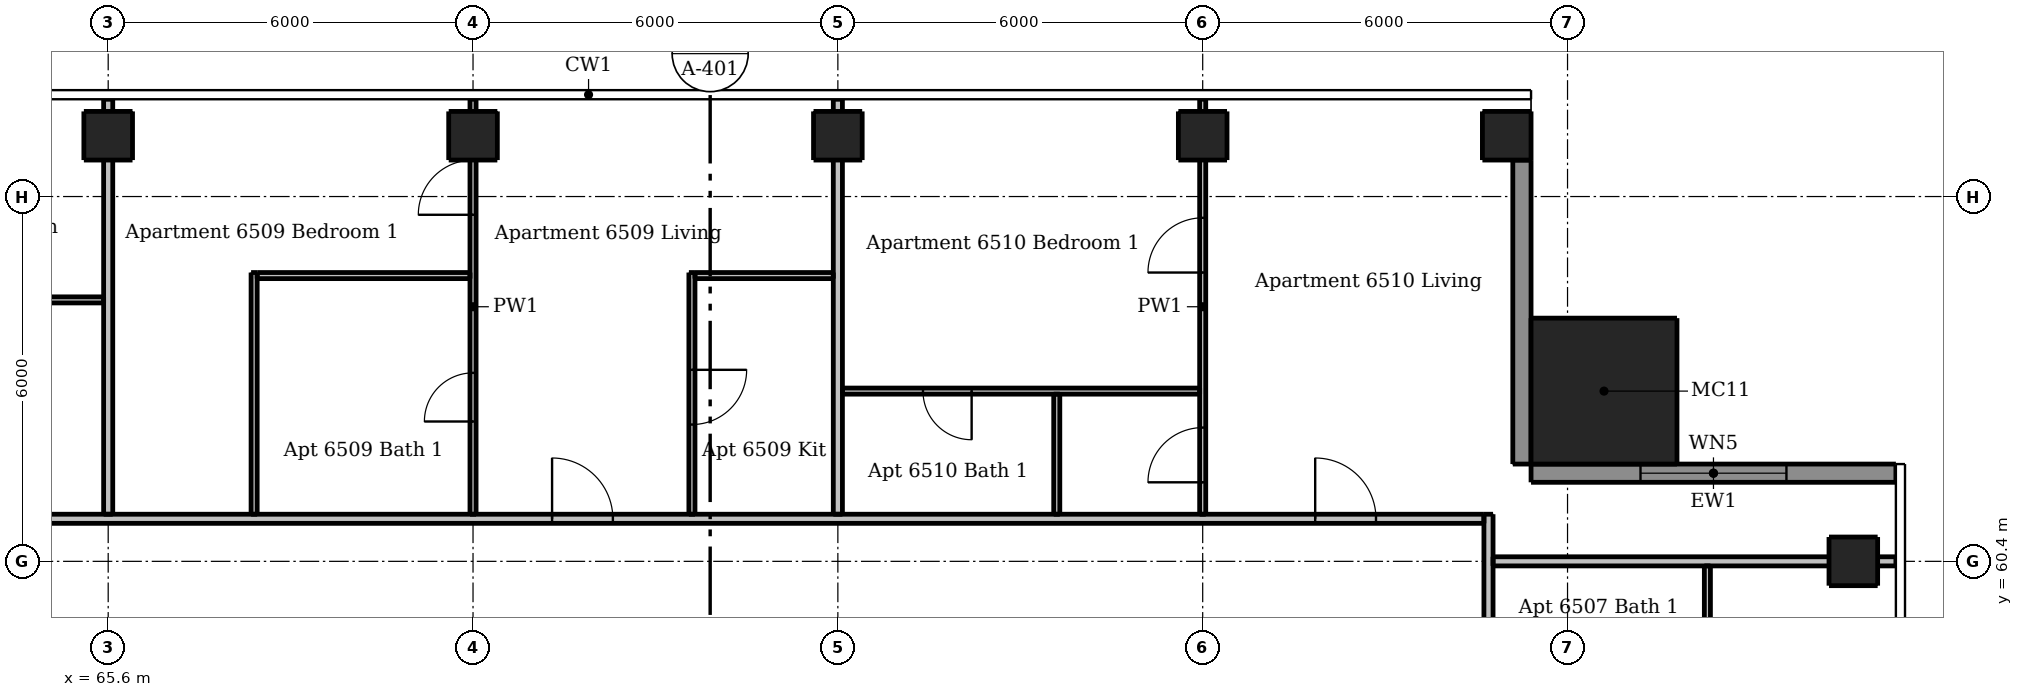
"""IFC4 building model, lengths in metres.
Left out: names, types, materials, properties, quantities, classifications, styles, units other than length and angle.
Written with IfcOpenShell. Run it as: python <this file> out.ifc"""

import sys

from ifc_helpers import new_model, si_unit, direction, frame, frame_2d, origin, origin_2d, place, context, subcontext, project, spatial, rectangle, extrude, element, fill, save


model = new_model("IFC4")
c1 = context("Model", 3, precision=1e-05, world=origin(), true_north=direction((0.0, 1.0)))
c2 = subcontext(c1, "Body", "Model", "MODEL_VIEW")
j1 = project(units=[si_unit("LENGTHUNIT", "METRE"), si_unit("PLANEANGLEUNIT", "RADIAN")], contexts=[c1])
p1 = place(None, origin())
s1 = spatial("IfcSite", under=j1, at=p1, CompositionType="ELEMENT")
p2 = place(p1, origin())
s2 = spatial("IfcBuilding", under=s1, at=p2, CompositionType="ELEMENT")
p3 = place(p2, frame((0.0, 0.0, 245.5)))
s3 = spatial("IfcBuildingStorey", under=s2, at=p3, CompositionType="ELEMENT", Elevation=245.5)
for number, where, z_axis, x_axis in (
    (1, (94.3, 60.4, 0.0), (0.0, 0.0, 1.0), (1.0, 0.0, 0.0)),
    (2, (65.6, 67.4, 0.0), (0.0, 0.0, 1.0), (1.0, 0.0, 0.0)),
    (3, (71.6, 67.4, 0.0), (0.0, 0.0, 1.0), (1.0, 0.0, 0.0)),
    (4, (77.6, 67.4, 0.0), (0.0, 0.0, 1.0), (1.0, 0.0, 0.0)),
    (5, (83.6, 67.4, 0.0), (0.0, 0.0, 1.0), (1.0, 0.0, 0.0)),
    (6, (88.6, 67.4, 0.0), (0.0, 0.0, 1.0), (1.0, 0.0, 0.0)),
):
    element("IfcColumn", number, at=place(p3, frame(where, z_axis=z_axis, x_axis=x_axis)), inside=s3, PredefinedType="COLUMN", context=c2, shape_type="SweptSolid", body=[
        extrude(rectangle(XDim=0.8, YDim=0.8, at=origin_2d()), origin(), (0.0, 0.0, 1.0), 3.05),
    ])
p4 = place(p3, frame((90.2, 63.2, 0.0), z_axis=(0.0, 0.0, 1.0), x_axis=(1.0, 0.0, 0.0)))
e7 = element("IfcColumn", 7, at=p4, inside=s3, PredefinedType="COLUMN", context=c2, shape_type="SweptSolid", body=[
    extrude(rectangle(XDim=2.4, YDim=2.4, at=origin_2d()), origin(), (0.0, 0.0, 1.0), 3.3),
])
p5 = place(p3, frame((95.0, 61.85, 0.0), z_axis=(0.0, 0.0, 1.0), x_axis=(-1.0, 0.0, 0.0)))
e8 = element("IfcWall", 8, at=p5, inside=s3, PredefinedType="SOLIDWALL", context=c2, shape_type="SweptSolid", body=[
    extrude(rectangle(XDim=6.0, YDim=0.3, at=frame_2d((3.0, 0.0))), origin(), (0.0, 0.0, 1.0), 3.05),
])
p6 = place(p5, frame((1.8, 0.0, 0.15)))
e9 = element("IfcOpeningElement", 9, at=p6, cuts=e8, PredefinedType="OPENING", context=c2, shape_type="SweptSolid", body=[
    extrude(rectangle(XDim=2.4, YDim=2.1, at=frame_2d((1.2, 1.05))), frame((0.0, 0.16, 0.0), z_axis=(0.0, -1.0, 0.0), x_axis=(1.0, 0.0, 0.0)), (0.0, 0.0, 1.0), 0.32),
])
p7 = place(p3, frame((88.85, 62.0, 0.0), z_axis=(0.0, 0.0, 1.0), x_axis=(0.0, 1.0, 0.0)))
e10 = element("IfcWall", 10, at=p7, inside=s3, PredefinedType="SOLIDWALL", context=c2, shape_type="SweptSolid", body=[
    extrude(rectangle(XDim=5.0, YDim=0.3, at=frame_2d((2.5, 0.0))), origin(), (0.0, 0.0, 1.0), 3.05),
])
p8 = place(p3, frame((68.0, 61.175, 0.0), z_axis=(0.0, 0.0, 1.0), x_axis=(0.0, 1.0, 0.0)))
e11 = element("IfcWall", 11, at=p8, inside=s3, PredefinedType="PARTITIONING", context=c2, shape_type="SweptSolid", body=[
    extrude(rectangle(XDim=3.975, YDim=0.1, at=frame_2d((1.987, 0.0))), origin(), (0.0, 0.0, 1.0), 3.05),
])
p9 = place(p3, frame((71.6, 61.175, 0.0), z_axis=(0.0, 0.0, 1.0), x_axis=(0.0, 1.0, 0.0)))
e12 = element("IfcWall", 12, at=p9, inside=s3, PredefinedType="PARTITIONING", context=c2, shape_type="SweptSolid", body=[
    extrude(rectangle(XDim=6.825, YDim=0.1, at=frame_2d((3.413, 0.0))), origin(), (0.0, 0.0, 1.0), 2.516),
])
p10 = place(p9, frame((4.925, 0.0, 0.0)))
e13 = element("IfcOpeningElement", 13, at=p10, cuts=e12, PredefinedType="OPENING", context=c2, shape_type="SweptSolid", body=[
    extrude(rectangle(XDim=0.9, YDim=2.1, at=frame_2d((0.45, 1.05))), frame((0.0, 0.06, 0.0), z_axis=(0.0, -1.0, 0.0), x_axis=(1.0, 0.0, 0.0)), (0.0, 0.0, 1.0), 0.12),
])
p11 = place(p9, frame((1.525, 0.0, 0.0)))
e14 = element("IfcOpeningElement", 14, at=p11, cuts=e12, PredefinedType="OPENING", context=c2, shape_type="SweptSolid", body=[
    extrude(rectangle(XDim=0.8, YDim=2.1, at=frame_2d((0.4, 1.05))), frame((0.0, 0.06, 0.0), z_axis=(0.0, -1.0, 0.0), x_axis=(1.0, 0.0, 0.0)), (0.0, 0.0, 1.0), 0.12),
])
p12 = place(p3, frame((75.2, 65.15, 0.0), z_axis=(0.0, 0.0, 1.0), x_axis=(0.0, -1.0, 0.0)))
e15 = element("IfcWall", 15, at=p12, inside=s3, PredefinedType="PARTITIONING", context=c2, shape_type="SweptSolid", body=[
    extrude(rectangle(XDim=3.975, YDim=0.1, at=frame_2d((1.987, 0.0))), origin(), (0.0, 0.0, 1.0), 3.05),
])
p13 = place(p12, frame((1.6, 0.0, 0.0)))
e16 = element("IfcOpeningElement", 16, at=p13, cuts=e15, PredefinedType="OPENING", context=c2, shape_type="SweptSolid", body=[
    extrude(rectangle(XDim=0.9, YDim=2.1, at=frame_2d((0.45, 1.05))), frame((0.0, 0.06, 0.0), z_axis=(0.0, -1.0, 0.0), x_axis=(1.0, 0.0, 0.0)), (0.0, 0.0, 1.0), 0.12),
])
p14 = place(p3, frame((81.2, 61.175, 0.0), z_axis=(0.0, 0.0, 1.0), x_axis=(0.0, 1.0, 0.0)))
e17 = element("IfcWall", 17, at=p14, inside=s3, PredefinedType="PARTITIONING", context=c2, shape_type="SweptSolid", body=[
    extrude(rectangle(XDim=1.975, YDim=0.1, at=frame_2d((0.987, 0.0))), origin(), (0.0, 0.0, 1.0), 3.05),
])
p15 = place(p3, frame((83.6, 61.175, 0.0), z_axis=(0.0, 0.0, 1.0), x_axis=(0.0, 1.0, 0.0)))
e18 = element("IfcWall", 18, at=p15, inside=s3, PredefinedType="PARTITIONING", context=c2, shape_type="SweptSolid", body=[
    extrude(rectangle(XDim=6.825, YDim=0.1, at=frame_2d((3.413, 0.0))), origin(), (0.0, 0.0, 1.0), 2.516),
])
p16 = place(p15, frame((0.525, 0.0, 0.0)))
e19 = element("IfcOpeningElement", 19, at=p16, cuts=e18, PredefinedType="OPENING", context=c2, shape_type="SweptSolid", body=[
    extrude(rectangle(XDim=0.9, YDim=2.1, at=frame_2d((0.45, 1.05))), frame((0.0, 0.06, 0.0), z_axis=(0.0, -1.0, 0.0), x_axis=(1.0, 0.0, 0.0)), (0.0, 0.0, 1.0), 0.12),
])
p17 = place(p15, frame((3.975, 0.0, 0.0)))
e20 = element("IfcOpeningElement", 20, at=p17, cuts=e18, PredefinedType="OPENING", context=c2, shape_type="SweptSolid", body=[
    extrude(rectangle(XDim=0.9, YDim=2.1, at=frame_2d((0.45, 1.05))), frame((0.0, 0.06, 0.0), z_axis=(0.0, -1.0, 0.0), x_axis=(1.0, 0.0, 0.0)), (0.0, 0.0, 1.0), 0.12),
])
p18 = place(p3, frame((91.9, 58.25, 0.0), z_axis=(0.0, 0.0, 1.0), x_axis=(0.0, 1.0, 0.0)))
e21 = element("IfcWall", 21, at=p18, inside=s3, PredefinedType="PARTITIONING", context=c2, shape_type="SweptSolid", body=[
    extrude(rectangle(XDim=2.075, YDim=0.1, at=frame_2d((1.038, 0.0))), origin(), (0.0, 0.0, 1.0), 3.05),
])
p19 = place(p3, frame((68.05, 65.1, 0.0), z_axis=(0.0, 0.0, 1.0), x_axis=(1.0, 0.0, 0.0)))
e22 = element("IfcWall", 22, at=p19, inside=s3, PredefinedType="PARTITIONING", context=c2, shape_type="SweptSolid", body=[
    extrude(rectangle(XDim=3.5, YDim=0.1, at=frame_2d((1.75, 0.0))), origin(), (0.0, 0.0, 1.0), 3.05),
])
p20 = place(p3, frame((75.25, 65.1, 0.0), z_axis=(0.0, 0.0, 1.0), x_axis=(1.0, 0.0, 0.0)))
e23 = element("IfcWall", 23, at=p20, inside=s3, PredefinedType="PARTITIONING", context=c2, shape_type="SweptSolid", body=[
    extrude(rectangle(XDim=2.275, YDim=0.1, at=frame_2d((1.137, 0.0))), origin(), (0.0, 0.0, 1.0), 3.05),
])
p21 = place(p3, frame((63.55, 64.7, 0.0), z_axis=(0.0, 0.0, 1.0), x_axis=(1.0, 0.0, 0.0)))
e24 = element("IfcWall", 24, at=p21, inside=s3, PredefinedType="PARTITIONING", context=c2, shape_type="SweptSolid", body=[
    extrude(rectangle(XDim=1.975, YDim=0.1, at=frame_2d((0.987, 0.0))), origin(), (0.0, 0.0, 1.0), 3.05),
])
p22 = place(p3, frame((83.55, 63.2, 0.0), z_axis=(0.0, 0.0, 1.0), x_axis=(-1.0, 0.0, 0.0)))
e25 = element("IfcWall", 25, at=p22, inside=s3, PredefinedType="PARTITIONING", context=c2, shape_type="SweptSolid", body=[
    extrude(rectangle(XDim=5.875, YDim=0.1, at=frame_2d((2.938, 0.0))), origin(), (0.0, 0.0, 1.0), 3.05),
])
p23 = place(p22, frame((3.75, 0.0, 0.0)))
e26 = element("IfcOpeningElement", 26, at=p23, cuts=e25, PredefinedType="OPENING", context=c2, shape_type="SweptSolid", body=[
    extrude(rectangle(XDim=0.8, YDim=2.1, at=frame_2d((0.4, 1.05))), frame((0.0, 0.06, 0.0), z_axis=(0.0, -1.0, 0.0), x_axis=(1.0, 0.0, 0.0)), (0.0, 0.0, 1.0), 0.12),
])
for number, where, z_axis, x_axis in (
    (27, (65.6, 61.175, 0.0), (0.0, 0.0, 1.0), (0.0, 1.0, 0.0)),
    (28, (77.6, 61.175, 0.0), (0.0, 0.0, 1.0), (0.0, 1.0, 0.0)),
):
    element("IfcWall", number, at=place(p3, frame(where, z_axis=z_axis, x_axis=x_axis)), inside=s3, PredefinedType="PARTITIONING", context=c2, shape_type="SweptSolid", body=[
        extrude(rectangle(XDim=6.825, YDim=0.15, at=frame_2d((3.413, 0.0))), origin(), (0.0, 0.0, 1.0), 2.516),
    ])
p24 = place(p3, frame((88.3, 61.175, 0.0), z_axis=(0.0, 0.0, 1.0), x_axis=(0.0, -1.0, 0.0)))
e29 = element("IfcWall", 29, at=p24, inside=s3, PredefinedType="PARTITIONING", context=c2, shape_type="SweptSolid", body=[
    extrude(rectangle(XDim=29.4, YDim=0.15, at=frame_2d((14.7, 0.0))), origin(), (0.0, 0.0, 1.0), 3.05),
])
p25 = place(p24, frame((26.625, 0.0, 0.0)))
e30 = element("IfcOpeningElement", 30, at=p25, cuts=e29, PredefinedType="OPENING", context=c2, shape_type="SweptSolid", body=[
    extrude(rectangle(XDim=1.0, YDim=2.1, at=frame_2d((0.5, 1.05))), frame((0.0, 0.085, 0.0), z_axis=(0.0, -1.0, 0.0), x_axis=(1.0, 0.0, 0.0)), (0.0, 0.0, 1.0), 0.17),
])
p26 = place(p24, frame((15.275, 0.0, 0.0)))
e31 = element("IfcOpeningElement", 31, at=p26, cuts=e29, PredefinedType="OPENING", context=c2, shape_type="SweptSolid", body=[
    extrude(rectangle(XDim=1.0, YDim=2.1, at=frame_2d((0.5, 1.05))), frame((0.0, 0.085, 0.0), z_axis=(0.0, -1.0, 0.0), x_axis=(1.0, 0.0, 0.0)), (0.0, 0.0, 1.0), 0.17),
])
p27 = place(p24, frame((9.275, 0.0, 0.0)))
e32 = element("IfcOpeningElement", 32, at=p27, cuts=e29, PredefinedType="OPENING", context=c2, shape_type="SweptSolid", body=[
    extrude(rectangle(XDim=1.0, YDim=2.1, at=frame_2d((0.5, 1.05))), frame((0.0, 0.085, 0.0), z_axis=(0.0, -1.0, 0.0), x_axis=(1.0, 0.0, 0.0)), (0.0, 0.0, 1.0), 0.17),
])
p28 = place(p24, frame((3.275, 0.0, 0.0)))
e33 = element("IfcOpeningElement", 33, at=p28, cuts=e29, PredefinedType="OPENING", context=c2, shape_type="SweptSolid", body=[
    extrude(rectangle(XDim=1.0, YDim=2.1, at=frame_2d((0.5, 1.05))), frame((0.0, 0.085, 0.0), z_axis=(0.0, -1.0, 0.0), x_axis=(1.0, 0.0, 0.0)), (0.0, 0.0, 1.0), 0.17),
])
p29 = place(p3, frame((58.975, 61.1, 0.0), z_axis=(0.0, 0.0, 1.0), x_axis=(1.0, 0.0, 0.0)))
e34 = element("IfcWall", 34, at=p29, inside=s3, PredefinedType="PARTITIONING", context=c2, shape_type="SweptSolid", body=[
    extrude(rectangle(XDim=29.25, YDim=0.15, at=frame_2d((14.625, 0.0))), origin(), (0.0, 0.0, 1.0), 3.05),
])
p30 = place(p29, frame((3.125, 0.0, 0.0)))
e35 = element("IfcOpeningElement", 35, at=p30, cuts=e34, PredefinedType="OPENING", context=c2, shape_type="SweptSolid", body=[
    extrude(rectangle(XDim=1.0, YDim=2.1, at=frame_2d((0.5, 1.05))), frame((0.0, 0.085, 0.0), z_axis=(0.0, -1.0, 0.0), x_axis=(1.0, 0.0, 0.0)), (0.0, 0.0, 1.0), 0.17),
])
p31 = place(p29, frame((13.925, 0.0, 0.0)))
e36 = element("IfcOpeningElement", 36, at=p31, cuts=e34, PredefinedType="OPENING", context=c2, shape_type="SweptSolid", body=[
    extrude(rectangle(XDim=1.0, YDim=2.1, at=frame_2d((0.5, 1.05))), frame((0.0, 0.085, 0.0), z_axis=(0.0, -1.0, 0.0), x_axis=(1.0, 0.0, 0.0)), (0.0, 0.0, 1.0), 0.17),
])
p32 = place(p29, frame((26.475, 0.0, 0.0)))
e37 = element("IfcOpeningElement", 37, at=p32, cuts=e34, PredefinedType="OPENING", context=c2, shape_type="SweptSolid", body=[
    extrude(rectangle(XDim=1.0, YDim=2.1, at=frame_2d((0.5, 1.05))), frame((0.0, 0.085, 0.0), z_axis=(0.0, -1.0, 0.0), x_axis=(1.0, 0.0, 0.0)), (0.0, 0.0, 1.0), 0.17),
])
p33 = place(p3, frame((88.375, 60.4, 0.0), z_axis=(0.0, 0.0, 1.0), x_axis=(1.0, 0.0, 0.0)))
e38 = element("IfcWall", 38, at=p33, inside=s3, PredefinedType="PARTITIONING", context=c2, shape_type="SweptSolid", body=[
    extrude(rectangle(XDim=6.625, YDim=0.15, at=frame_2d((3.312, 0.0))), origin(), (0.0, 0.0, 1.0), 2.647),
])
p34 = place(p6, origin())
e39 = element("IfcWindow", 39, at=p34, inside=s3, PartitioningType="DOUBLE_PANEL_VERTICAL", PredefinedType="WINDOW", context=c2, shape_type="SweptSolid", body=[
    extrude(rectangle(XDim=2.4, YDim=2.1, at=frame_2d((1.2, 1.05))), frame((0.0, 0.03, 0.0), z_axis=(0.0, -1.0, 0.0), x_axis=(1.0, 0.0, 0.0)), (0.0, 0.0, 1.0), 0.06),
])
fill(e9, e39)
p35 = place(p31, origin())
e40 = element("IfcDoor", 40, at=p35, inside=s3, OperationType="SINGLE_SWING_LEFT", PredefinedType="DOOR", context=c2, shape_type="SweptSolid", body=[
    extrude(rectangle(XDim=1.0, YDim=2.1, at=frame_2d((0.5, 1.05))), frame((0.0, 0.025, 0.0), z_axis=(0.0, -1.0, 0.0), x_axis=(1.0, 0.0, 0.0)), (0.0, 0.0, 1.0), 0.05),
])
fill(e36, e40)
p36 = place(p13, origin())
e41 = element("IfcDoor", 41, at=p36, inside=s3, OperationType="SINGLE_SWING_LEFT", PredefinedType="DOOR", context=c2, shape_type="SweptSolid", body=[
    extrude(rectangle(XDim=0.9, YDim=2.1, at=frame_2d((0.45, 1.05))), frame((0.0, 0.025, 0.0), z_axis=(0.0, -1.0, 0.0), x_axis=(1.0, 0.0, 0.0)), (0.0, 0.0, 1.0), 0.05),
])
fill(e16, e41)
p37 = place(p10, origin())
e42 = element("IfcDoor", 42, at=p37, inside=s3, OperationType="SINGLE_SWING_LEFT", PredefinedType="DOOR", context=c2, shape_type="SweptSolid", body=[
    extrude(rectangle(XDim=0.9, YDim=2.1, at=frame_2d((0.45, 1.05))), frame((0.0, 0.025, 0.0), z_axis=(0.0, -1.0, 0.0), x_axis=(1.0, 0.0, 0.0)), (0.0, 0.0, 1.0), 0.05),
])
fill(e13, e42)
p38 = place(p11, origin())
e43 = element("IfcDoor", 43, at=p38, inside=s3, OperationType="SINGLE_SWING_LEFT", PredefinedType="DOOR", context=c2, shape_type="SweptSolid", body=[
    extrude(rectangle(XDim=0.8, YDim=2.1, at=frame_2d((0.4, 1.05))), frame((0.0, 0.025, 0.0), z_axis=(0.0, -1.0, 0.0), x_axis=(1.0, 0.0, 0.0)), (0.0, 0.0, 1.0), 0.05),
])
fill(e14, e43)
p39 = place(p32, origin())
e44 = element("IfcDoor", 44, at=p39, inside=s3, OperationType="SINGLE_SWING_LEFT", PredefinedType="DOOR", context=c2, shape_type="SweptSolid", body=[
    extrude(rectangle(XDim=1.0, YDim=2.1, at=frame_2d((0.5, 1.05))), frame((0.0, 0.025, 0.0), z_axis=(0.0, -1.0, 0.0), x_axis=(1.0, 0.0, 0.0)), (0.0, 0.0, 1.0), 0.05),
])
fill(e37, e44)
p40 = place(p16, origin())
e45 = element("IfcDoor", 45, at=p40, inside=s3, OperationType="SINGLE_SWING_LEFT", PredefinedType="DOOR", context=c2, shape_type="SweptSolid", body=[
    extrude(rectangle(XDim=0.9, YDim=2.1, at=frame_2d((0.45, 1.05))), frame((0.0, 0.025, 0.0), z_axis=(0.0, -1.0, 0.0), x_axis=(1.0, 0.0, 0.0)), (0.0, 0.0, 1.0), 0.05),
])
fill(e19, e45)
p41 = place(p17, origin())
e46 = element("IfcDoor", 46, at=p41, inside=s3, OperationType="SINGLE_SWING_LEFT", PredefinedType="DOOR", context=c2, shape_type="SweptSolid", body=[
    extrude(rectangle(XDim=0.9, YDim=2.1, at=frame_2d((0.45, 1.05))), frame((0.0, 0.025, 0.0), z_axis=(0.0, -1.0, 0.0), x_axis=(1.0, 0.0, 0.0)), (0.0, 0.0, 1.0), 0.05),
])
fill(e20, e46)
p42 = place(p23, origin())
e47 = element("IfcDoor", 47, at=p42, inside=s3, OperationType="SINGLE_SWING_LEFT", PredefinedType="DOOR", context=c2, shape_type="SweptSolid", body=[
    extrude(rectangle(XDim=0.8, YDim=2.1, at=frame_2d((0.4, 1.05))), frame((0.0, 0.025, 0.0), z_axis=(0.0, -1.0, 0.0), x_axis=(1.0, 0.0, 0.0)), (0.0, 0.0, 1.0), 0.05),
])
fill(e26, e47)
save(model, sys.argv[1])
